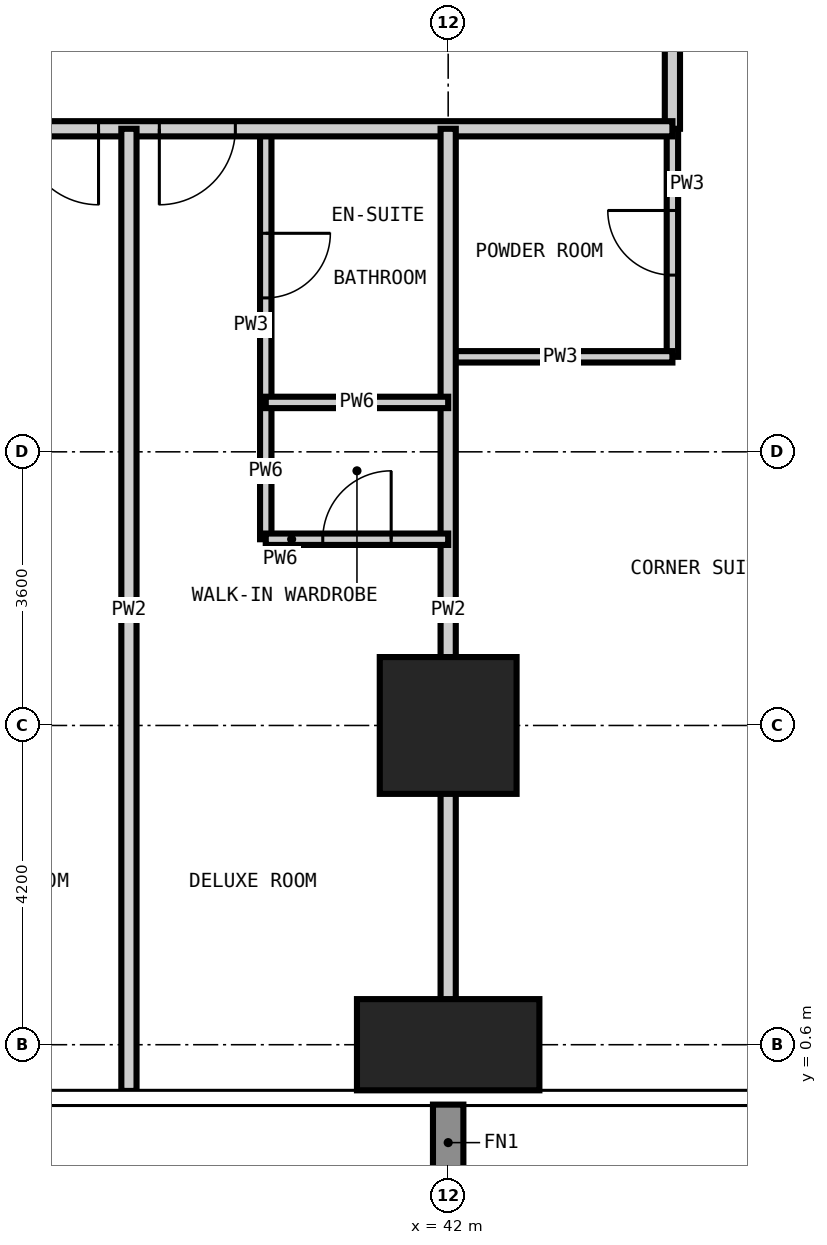
"""IFC4 building model, lengths in metres.
Left out: names, types, materials, properties, quantities, classifications, styles, units other than length and angle.
Written with IfcOpenShell. Run it as: python <this file> out.ifc"""

import sys

from ifc_helpers import new_model, si_unit, direction, frame, frame_2d, origin, origin_2d, place, context, subcontext, project, spatial, rectangle, extrude, element, fill, save


model = new_model("IFC4")
c1 = context("Model", 3, precision=1e-05, world=origin(), true_north=direction((0.0, 1.0)))
c2 = subcontext(c1, "Body", "Model", "MODEL_VIEW")
j1 = project(units=[si_unit("LENGTHUNIT", "METRE"), si_unit("PLANEANGLEUNIT", "RADIAN")], contexts=[c1])
p1 = place(None, origin())
s1 = spatial("IfcSite", under=j1, at=p1, CompositionType="ELEMENT")
p2 = place(p1, origin())
s2 = spatial("IfcBuilding", under=s1, at=p2, CompositionType="ELEMENT")
p3 = place(p2, frame((0.0, 0.0, 70.2)))
s3 = spatial("IfcBuildingStorey", under=s2, at=p3, CompositionType="ELEMENT", Elevation=70.2)
p4 = place(p3, frame((42.0, 0.6, -0.35), z_axis=(0.0, 0.0, 1.0), x_axis=(1.0, 0.0, 0.0)))
e1 = element("IfcColumn", 1, at=p4, inside=s3, PredefinedType="COLUMN", context=c2, shape_type="SweptSolid", body=[
    extrude(rectangle(XDim=2.4, YDim=1.2, at=origin_2d()), origin(), (0.0, 0.0, 1.0), 3.6),
])
p5 = place(p3, frame((42.0, 4.8, -0.35), z_axis=(0.0, 0.0, 1.0), x_axis=(1.0, 0.0, 0.0)))
e2 = element("IfcColumn", 2, at=p5, inside=s3, PredefinedType="COLUMN", context=c2, shape_type="SweptSolid", body=[
    extrude(rectangle(XDim=1.8, YDim=1.8, at=origin_2d()), origin(), (0.0, 0.0, 1.0), 3.6),
])
p6 = place(p3, frame((39.6, 9.05, 0.0), z_axis=(0.0, 0.0, 1.0), x_axis=(0.0, 1.0, 0.0)))
e3 = element("IfcWall", 3, at=p6, inside=s3, PredefinedType="PARTITIONING", context=c2, shape_type="SweptSolid", body=[
    extrude(rectangle(XDim=3.6, YDim=0.15, at=frame_2d((1.8, 0.0))), origin(), (0.0, 0.0, 1.0), 3.25),
])
p7 = place(p6, frame((1.375, 0.0, 0.0)))
e4 = element("IfcOpeningElement", 4, at=p7, cuts=e3, PredefinedType="OPENING", context=c2, shape_type="SweptSolid", body=[
    extrude(rectangle(XDim=0.85, YDim=2.1, at=frame_2d((0.425, 1.05))), frame((0.0, 0.085, 0.0), z_axis=(0.0, -1.0, 0.0), x_axis=(1.0, 0.0, 0.0)), (0.0, 0.0, 1.0), 0.17),
])
p8 = place(p3, frame((44.95, 9.65, 0.0), z_axis=(0.0, 0.0, 1.0), x_axis=(0.0, 1.0, 0.0)))
e5 = element("IfcWall", 5, at=p8, inside=s3, PredefinedType="PARTITIONING", context=c2, shape_type="SweptSolid", body=[
    extrude(rectangle(XDim=3.0, YDim=0.15, at=frame_2d((1.5, 0.0))), origin(), (0.0, 0.0, 1.0), 3.25),
])
p9 = place(p8, frame((1.075, 0.0, 0.0)))
e6 = element("IfcOpeningElement", 6, at=p9, cuts=e5, PredefinedType="OPENING", context=c2, shape_type="SweptSolid", body=[
    extrude(rectangle(XDim=0.85, YDim=2.1, at=frame_2d((0.425, 1.05))), frame((0.0, 0.085, 0.0), z_axis=(0.0, -1.0, 0.0), x_axis=(1.0, 0.0, 0.0)), (0.0, 0.0, 1.0), 0.17),
])
p10 = place(p3, frame((42.0, 9.65, 0.0), z_axis=(0.0, 0.0, 1.0), x_axis=(1.0, 0.0, 0.0)))
e7 = element("IfcWall", 7, at=p10, inside=s3, PredefinedType="PARTITIONING", context=c2, shape_type="SweptSolid", body=[
    extrude(rectangle(XDim=2.95, YDim=0.15, at=frame_2d((1.475, 0.0))), origin(), (0.0, 0.0, 1.0), 3.25),
])
p11 = place(p3, frame((44.95, 45.55, 0.0), z_axis=(0.0, 0.0, 1.0), x_axis=(0.0, -1.0, 0.0)))
e8 = element("IfcWall", 8, at=p11, inside=s3, PredefinedType="PARTITIONING", context=c2, shape_type="SweptSolid", body=[
    extrude(rectangle(XDim=32.9, YDim=0.2, at=frame_2d((16.45, 0.0))), origin(), (0.0, 0.0, 1.0), 3.25),
])
p12 = place(p11, frame((24.95, 0.0, 0.0)))
e9 = element("IfcOpeningElement", 9, at=p12, cuts=e8, PredefinedType="OPENING", context=c2, shape_type="SweptSolid", body=[
    extrude(rectangle(XDim=1.0, YDim=2.2, at=frame_2d((0.5, 1.1))), frame((0.0, 0.11, 0.0), z_axis=(0.0, -1.0, 0.0), x_axis=(1.0, 0.0, 0.0)), (0.0, 0.0, 1.0), 0.22),
])
p13 = place(p11, frame((21.05, 0.0, 0.0)))
e10 = element("IfcOpeningElement", 10, at=p13, cuts=e8, PredefinedType="OPENING", context=c2, shape_type="SweptSolid", body=[
    extrude(rectangle(XDim=1.0, YDim=2.2, at=frame_2d((0.5, 1.1))), frame((0.0, 0.11, 0.0), z_axis=(0.0, -1.0, 0.0), x_axis=(1.0, 0.0, 0.0)), (0.0, 0.0, 1.0), 0.22),
])
p14 = place(p11, frame((10.25, 0.0, 0.0)))
e11 = element("IfcOpeningElement", 11, at=p14, cuts=e8, PredefinedType="OPENING", context=c2, shape_type="SweptSolid", body=[
    extrude(rectangle(XDim=1.0, YDim=2.2, at=frame_2d((0.5, 1.1))), frame((0.0, 0.11, 0.0), z_axis=(0.0, -1.0, 0.0), x_axis=(1.0, 0.0, 0.0)), (0.0, 0.0, 1.0), 0.22),
])
p15 = place(p11, frame((6.35, 0.0, 0.0)))
e12 = element("IfcOpeningElement", 12, at=p15, cuts=e8, PredefinedType="OPENING", context=c2, shape_type="SweptSolid", body=[
    extrude(rectangle(XDim=1.0, YDim=2.2, at=frame_2d((0.5, 1.1))), frame((0.0, 0.11, 0.0), z_axis=(0.0, -1.0, 0.0), x_axis=(1.0, 0.0, 0.0)), (0.0, 0.0, 1.0), 0.22),
])
p16 = place(p11, frame((30.325, 0.0, 0.0)))
e13 = element("IfcOpeningElement", 13, at=p16, cuts=e8, PredefinedType="OPENING", context=c2, shape_type="SweptSolid", body=[
    extrude(rectangle(XDim=1.0, YDim=2.2, at=frame_2d((0.5, 1.1))), frame((0.0, 0.11, 0.0), z_axis=(0.0, -1.0, 0.0), x_axis=(1.0, 0.0, 0.0)), (0.0, 0.0, 1.0), 0.22),
])
p17 = place(p11, frame((1.275, 0.0, 0.0)))
e14 = element("IfcOpeningElement", 14, at=p17, cuts=e8, PredefinedType="OPENING", context=c2, shape_type="SweptSolid", body=[
    extrude(rectangle(XDim=1.0, YDim=2.2, at=frame_2d((0.5, 1.1))), frame((0.0, 0.11, 0.0), z_axis=(0.0, -1.0, 0.0), x_axis=(1.0, 0.0, 0.0)), (0.0, 0.0, 1.0), 0.22),
])
p18 = place(p3, frame((44.95, 12.65, 0.0), z_axis=(0.0, 0.0, 1.0), x_axis=(-1.0, 0.0, 0.0)))
e15 = element("IfcWall", 15, at=p18, inside=s3, PredefinedType="PARTITIONING", context=c2, shape_type="SweptSolid", body=[
    extrude(rectangle(XDim=32.3, YDim=0.2, at=frame_2d((16.15, 0.0))), origin(), (0.0, 0.0, 1.0), 3.25),
])
p19 = place(p18, frame((24.35, 0.0, 0.0)))
e16 = element("IfcOpeningElement", 16, at=p19, cuts=e15, PredefinedType="OPENING", context=c2, shape_type="SweptSolid", body=[
    extrude(rectangle(XDim=1.0, YDim=2.2, at=frame_2d((0.5, 1.1))), frame((0.0, 0.11, 0.0), z_axis=(0.0, -1.0, 0.0), x_axis=(1.0, 0.0, 0.0)), (0.0, 0.0, 1.0), 0.22),
])
p20 = place(p18, frame((22.55, 0.0, 0.0)))
e17 = element("IfcOpeningElement", 17, at=p20, cuts=e15, PredefinedType="OPENING", context=c2, shape_type="SweptSolid", body=[
    extrude(rectangle(XDim=1.0, YDim=2.2, at=frame_2d((0.5, 1.1))), frame((0.0, 0.11, 0.0), z_axis=(0.0, -1.0, 0.0), x_axis=(1.0, 0.0, 0.0)), (0.0, 0.0, 1.0), 0.22),
])
p21 = place(p18, frame((15.95, 0.0, 0.0)))
e18 = element("IfcOpeningElement", 18, at=p21, cuts=e15, PredefinedType="OPENING", context=c2, shape_type="SweptSolid", body=[
    extrude(rectangle(XDim=1.0, YDim=2.2, at=frame_2d((0.5, 1.1))), frame((0.0, 0.11, 0.0), z_axis=(0.0, -1.0, 0.0), x_axis=(1.0, 0.0, 0.0)), (0.0, 0.0, 1.0), 0.22),
])
p22 = place(p18, frame((14.15, 0.0, 0.0)))
e19 = element("IfcOpeningElement", 19, at=p22, cuts=e15, PredefinedType="OPENING", context=c2, shape_type="SweptSolid", body=[
    extrude(rectangle(XDim=1.0, YDim=2.2, at=frame_2d((0.5, 1.1))), frame((0.0, 0.11, 0.0), z_axis=(0.0, -1.0, 0.0), x_axis=(1.0, 0.0, 0.0)), (0.0, 0.0, 1.0), 0.22),
])
p23 = place(p18, frame((7.55, 0.0, 0.0)))
e20 = element("IfcOpeningElement", 20, at=p23, cuts=e15, PredefinedType="OPENING", context=c2, shape_type="SweptSolid", body=[
    extrude(rectangle(XDim=1.0, YDim=2.2, at=frame_2d((0.5, 1.1))), frame((0.0, 0.11, 0.0), z_axis=(0.0, -1.0, 0.0), x_axis=(1.0, 0.0, 0.0)), (0.0, 0.0, 1.0), 0.22),
])
p24 = place(p18, frame((5.75, 0.0, 0.0)))
e21 = element("IfcOpeningElement", 21, at=p24, cuts=e15, PredefinedType="OPENING", context=c2, shape_type="SweptSolid", body=[
    extrude(rectangle(XDim=1.0, YDim=2.2, at=frame_2d((0.5, 1.1))), frame((0.0, 0.11, 0.0), z_axis=(0.0, -1.0, 0.0), x_axis=(1.0, 0.0, 0.0)), (0.0, 0.0, 1.0), 0.22),
])
for number, where, z_axis, x_axis in (
    (22, (37.8, -0.008, 0.0), (0.0, 0.0, 1.0), (0.0, 1.0, 0.0)),
    (23, (42.0, -0.008, 0.0), (0.0, 0.0, 1.0), (0.0, 1.0, 0.0)),
):
    element("IfcWall", number, at=place(p3, frame(where, z_axis=z_axis, x_axis=x_axis)), inside=s3, PredefinedType="PARTITIONING", context=c2, shape_type="SweptSolid", body=[
        extrude(rectangle(XDim=12.658, YDim=0.2, at=frame_2d((6.329, 0.0))), origin(), (0.0, 0.0, 1.0), 3.25),
    ])
p25 = place(p3, frame((39.6, 7.25, 0.0), z_axis=(0.0, 0.0, 1.0), x_axis=(0.0, 1.0, 0.0)))
e24 = element("IfcWall", 24, at=p25, inside=s3, PredefinedType="PARTITIONING", context=c2, shape_type="SweptSolid", body=[
    extrude(rectangle(XDim=1.8, YDim=0.15, at=frame_2d((0.9, 0.0))), origin(), (0.0, 0.0, 1.0), 3.25),
])
p26 = place(p3, frame((39.6, 7.25, 0.0), z_axis=(0.0, 0.0, 1.0), x_axis=(1.0, 0.0, 0.0)))
e25 = element("IfcWall", 25, at=p26, inside=s3, PredefinedType="PARTITIONING", context=c2, shape_type="SweptSolid", body=[
    extrude(rectangle(XDim=2.4, YDim=0.15, at=frame_2d((1.2, 0.0))), origin(), (0.0, 0.0, 1.0), 3.25),
])
p27 = place(p26, frame((0.75, 0.0, 0.0)))
e26 = element("IfcOpeningElement", 26, at=p27, cuts=e25, PredefinedType="OPENING", context=c2, shape_type="SweptSolid", body=[
    extrude(rectangle(XDim=0.9, YDim=2.1, at=frame_2d((0.45, 1.05))), frame((0.0, 0.085, 0.0), z_axis=(0.0, -1.0, 0.0), x_axis=(1.0, 0.0, 0.0)), (0.0, 0.0, 1.0), 0.17),
])
p28 = place(p3, frame((39.6, 9.05, 0.0), z_axis=(0.0, 0.0, 1.0), x_axis=(1.0, 0.0, 0.0)))
e27 = element("IfcWall", 27, at=p28, inside=s3, PredefinedType="PARTITIONING", context=c2, shape_type="SweptSolid", body=[
    extrude(rectangle(XDim=2.4, YDim=0.15, at=frame_2d((1.2, 0.0))), origin(), (0.0, 0.0, 1.0), 3.25),
])
p29 = place(p23, origin())
e28 = element("IfcDoor", 28, at=p29, inside=s3, OperationType="SINGLE_SWING_LEFT", PredefinedType="DOOR", context=c2, shape_type="SweptSolid", body=[
    extrude(rectangle(XDim=1.0, YDim=2.2, at=frame_2d((0.5, 1.1))), frame((0.0, 0.025, 0.0), z_axis=(0.0, -1.0, 0.0), x_axis=(1.0, 0.0, 0.0)), (0.0, 0.0, 1.0), 0.05),
])
fill(e20, e28)
p30 = place(p24, origin())
e29 = element("IfcDoor", 29, at=p30, inside=s3, OperationType="SINGLE_SWING_RIGHT", PredefinedType="DOOR", context=c2, shape_type="SweptSolid", body=[
    extrude(rectangle(XDim=1.0, YDim=2.2, at=frame_2d((0.5, 1.1))), frame((0.0, 0.025, 0.0), z_axis=(0.0, -1.0, 0.0), x_axis=(1.0, 0.0, 0.0)), (0.0, 0.0, 1.0), 0.05),
])
fill(e21, e29)
p31 = place(p7, frame((0.85, 0.0, 0.0), z_axis=(0.0, 0.0, 1.0), x_axis=(-1.0, 0.0, 0.0)))
e30 = element("IfcDoor", 30, at=p31, inside=s3, OperationType="SINGLE_SWING_LEFT", PredefinedType="DOOR", context=c2, shape_type="SweptSolid", body=[
    extrude(rectangle(XDim=0.85, YDim=2.1, at=frame_2d((0.425, 1.05))), frame((0.0, 0.025, 0.0), z_axis=(0.0, -1.0, 0.0), x_axis=(1.0, 0.0, 0.0)), (0.0, 0.0, 1.0), 0.05),
])
fill(e4, e30)
p32 = place(p27, origin())
e31 = element("IfcDoor", 31, at=p32, inside=s3, OperationType="SINGLE_SWING_RIGHT", PredefinedType="DOOR", context=c2, shape_type="SweptSolid", body=[
    extrude(rectangle(XDim=0.9, YDim=2.1, at=frame_2d((0.45, 1.05))), frame((0.0, 0.025, 0.0), z_axis=(0.0, -1.0, 0.0), x_axis=(1.0, 0.0, 0.0)), (0.0, 0.0, 1.0), 0.05),
])
fill(e26, e31)
p33 = place(p9, origin())
e32 = element("IfcDoor", 32, at=p33, inside=s3, OperationType="SINGLE_SWING_RIGHT", PredefinedType="DOOR", context=c2, shape_type="SweptSolid", body=[
    extrude(rectangle(XDim=0.85, YDim=2.1, at=frame_2d((0.425, 1.05))), frame((0.0, 0.025, 0.0), z_axis=(0.0, -1.0, 0.0), x_axis=(1.0, 0.0, 0.0)), (0.0, 0.0, 1.0), 0.05),
])
fill(e6, e32)
save(model, sys.argv[1])
